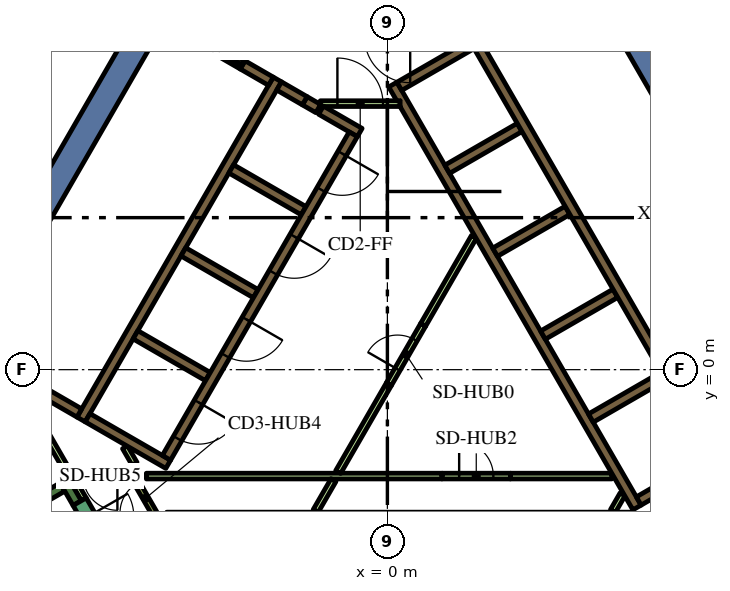
"""IFC4 building model, lengths in metres.
Left out: names, types, materials, properties, quantities, classifications, styles, units other than length and angle.
Written with IfcOpenShell. Run it as: python <this file> out.ifc"""

import sys

from ifc_helpers import new_model, si_unit, direction, frame, frame_2d, origin, place, context, subcontext, project, spatial, polyline, rectangle, outline, extrude, element, fill, save


model = new_model("IFC4")
c1 = context("Model", 3, precision=1e-05, world=origin(), true_north=direction((0.0, 1.0)))
c2 = subcontext(c1, "Body", "Model", "MODEL_VIEW")
j1 = project(units=[si_unit("LENGTHUNIT", "METRE"), si_unit("PLANEANGLEUNIT", "RADIAN")], contexts=[c1])
p1 = place(None, origin())
s1 = spatial("IfcSite", under=j1, at=p1, CompositionType="ELEMENT")
p2 = place(p1, origin())
s2 = spatial("IfcBuilding", under=s1, at=p2, CompositionType="ELEMENT")
p3 = place(p2, frame((0.0, 0.0, 205.8)))
s3 = spatial("IfcBuildingStorey", under=s2, at=p3, CompositionType="ELEMENT", Elevation=205.8)
p4 = place(p3, frame((8.235, 5.736, 0.0), z_axis=(0.0, 0.0, 1.0), x_axis=(-0.499983401189, 0.8660349869, 0.0)))
e1 = element("IfcWall", 1, at=p4, inside=s3, PredefinedType="SOLIDWALL", context=c2, shape_type="SweptSolid", body=[
    extrude(rectangle(XDim=12.472, YDim=0.7, at=frame_2d((6.236, 0.0))), origin(), (0.0, 0.0, 1.0), 4.2),
])
p5 = place(p3, frame((-4.696, 11.867, 0.0), z_axis=(0.0, 0.0, 1.0), x_axis=(-0.500003726532, -0.866023252259, 0.0)))
e2 = element("IfcWall", 2, at=p5, inside=s3, PredefinedType="SOLIDWALL", context=c2, shape_type="SweptSolid", body=[
    extrude(rectangle(XDim=12.848, YDim=0.7, at=frame_2d((6.424, 0.0))), origin(), (0.0, 0.0, 1.0), 4.2),
])
p6 = place(p3, frame((-14.44, -6.49, 0.0), z_axis=(0.0, 0.0, 1.0), x_axis=(0.866022966069, 0.500004222222, 0.0)))
e3 = element("IfcWall", 3, at=p6, inside=s3, PredefinedType="SOLIDWALL", context=c2, shape_type="SweptSolid", body=[
    extrude(rectangle(XDim=6.8, YDim=0.25, at=frame_2d((3.4, 0.0))), origin(), (0.0, 0.0, 1.0), 4.2),
])
p7 = place(p3, frame((-8.163, -3.511, 0.0), z_axis=(0.0, 0.0, 1.0), x_axis=(-0.499994068514, 0.866028828302, 0.0)))
e4 = element("IfcWall", 4, at=p7, inside=s3, PredefinedType="SOLIDWALL", context=c2, shape_type="SweptSolid", body=[
    extrude(rectangle(XDim=0.674, YDim=0.25, at=frame_2d((0.337, 0.0))), origin(), (0.0, 0.0, 1.0), 4.2),
])
p8 = place(p3, origin())
e5 = element("IfcWall", 5, at=p8, inside=s3, PredefinedType="SOLIDWALL", context=c2, shape_type="SweptSolid", body=[
    extrude(outline(polyline([(0.332, 6.925), (0.335, 6.925), (0.335, 6.925), (0.335, 6.925), (0.335, 7.075), (0.335, 7.075), (0.335, 7.075), (0.245, 7.075), (0.035, 7.439), (0.252, 7.564), (0.377, 7.348), (1.512, 5.382), (1.637, 5.165), (2.221, 4.153), (2.771, 3.199), (2.896, 2.983), (3.138, 2.564), (4.031, 1.017), (4.156, 0.801), (5.292, -1.165), (5.417, -1.382), (6.073, -2.519), (6.552, -3.348), (6.677, -3.564), (6.46, -3.689), (0.332, 6.925)])), origin(), (0.0, 0.0, 1.0), 4.2),
])
p9 = place(p3, frame((3.1, 9.064, 0.0), z_axis=(0.0, 0.0, 1.0), x_axis=(-0.866030133475, -0.499991807846, 0.0)))
e6 = element("IfcWall", 6, at=p9, inside=s3, PredefinedType="SOLIDWALL", context=c2, shape_type="SweptSolid", body=[
    extrude(rectangle(XDim=3.217, YDim=0.25, at=frame_2d((1.608, 0.0))), origin(), (0.0, 0.0, 1.0), 4.2),
])
p10 = place(p3, frame((1.574, 5.274, 0.0), z_axis=(0.0, 0.0, 1.0), x_axis=(0.866028486751, 0.499994660107, 0.0)))
e7 = element("IfcWall", 7, at=p10, inside=s3, PredefinedType="SOLIDWALL", context=c2, shape_type="SweptSolid", body=[
    extrude(rectangle(XDim=2.2, YDim=0.25, at=frame_2d((1.1, 0.0))), origin(), (0.0, 0.0, 1.0), 4.2),
])
for number, where, z_axis, x_axis in (
    (8, (2.834, 3.091, 0.0), (0.0, 0.0, 1.0), (0.866, 0.5, 0.0)),
    (9, (4.094, 0.909, 0.0), (0.0, 0.0, 1.0), (0.866, 0.5, 0.0)),
    (10, (5.354, -1.274, 0.0), (0.0, 0.0, 1.0), (0.866, 0.5, 0.0)),
):
    element("IfcWall", number, at=place(p3, frame(where, z_axis=z_axis, x_axis=x_axis)), inside=s3, PredefinedType="SOLIDWALL", context=c2, shape_type="SweptSolid", body=[
        extrude(rectangle(XDim=2.2, YDim=0.25, at=frame_2d((1.1, 0.0))), origin(), (0.0, 0.0, 1.0), 4.2),
    ])
p11 = place(p3, frame((11.507, -0.631, 0.0), z_axis=(0.0, 0.0, 1.0), x_axis=(-0.866011447264, -0.500024172624, 0.0)))
e11 = element("IfcWall", 11, at=p11, inside=s3, PredefinedType="SOLIDWALL", context=c2, shape_type="SweptSolid", body=[
    extrude(rectangle(XDim=5.65, YDim=0.25, at=frame_2d((2.825, 0.0))), origin(), (0.0, 0.0, 1.0), 4.2),
])
p12 = place(p3, frame((-8.06, -1.311, 0.0), z_axis=(0.0, 0.0, 1.0), x_axis=(0.50000273126, 0.866023826885, 0.0)))
e12 = element("IfcWall", 12, at=p12, inside=s3, PredefinedType="SOLIDWALL", context=c2, shape_type="SweptSolid", body=[
    extrude(rectangle(XDim=10.33, YDim=0.25, at=frame_2d((5.165, 0.0))), origin(), (0.0, 0.0, 1.0), 4.2),
])
p13 = place(p3, frame((-1.819, 6.87, 0.0), z_axis=(0.0, 0.0, 1.0), x_axis=(-0.866294599386, 0.499533449405, 0.0)))
e13 = element("IfcWall", 13, at=p13, inside=s3, PredefinedType="SOLIDWALL", context=c2, shape_type="SweptSolid", body=[
    extrude(rectangle(XDim=0.41, YDim=0.25, at=frame_2d((0.205, 0.0))), origin(), (0.0, 0.0, 1.0), 4.2),
])
p14 = place(p3, frame((-2.849, 7.465, 0.0), z_axis=(0.0, 0.0, 1.0), x_axis=(0.865955664968, -0.500120771724, 0.0)))
e14 = element("IfcWall", 14, at=p14, inside=s3, PredefinedType="SOLIDWALL", context=c2, shape_type="SweptSolid", body=[
    extrude(rectangle(XDim=0.778, YDim=0.25, at=frame_2d((0.389, 0.0))), origin(), (0.0, 0.0, 1.0), 4.2),
])
p15 = place(p3, frame((-0.728, 6.24, 0.0), z_axis=(0.0, 0.0, 1.0), x_axis=(-0.866002680491, 0.500039355833, 0.0)))
e15 = element("IfcWall", 15, at=p15, inside=s3, PredefinedType="SOLIDWALL", context=c2, shape_type="SweptSolid", body=[
    extrude(rectangle(XDim=1.178, YDim=0.25, at=frame_2d((0.589, 0.0))), origin(), (0.0, 0.0, 1.0), 4.2),
])
for number, where, z_axis, x_axis in (
    (16, (-2.204, 4.182, 0.0), (0.0, 0.0, 1.0), (-0.866, 0.5, 0.0)),
    (17, (-5.369, 3.1, 0.0), (0.0, 0.0, 1.0), (0.866, -0.5, 0.0)),
    (18, (-4.724, -0.182, 0.0), (0.0, 0.0, 1.0), (-0.866, 0.5, 0.0)),
):
    element("IfcWall", number, at=place(p3, frame(where, z_axis=z_axis, x_axis=x_axis)), inside=s3, PredefinedType="SOLIDWALL", context=c2, shape_type="SweptSolid", body=[
        extrude(rectangle(XDim=2.2, YDim=0.25, at=frame_2d((1.1, 0.0))), origin(), (0.0, 0.0, 1.0), 4.2),
    ])
p16 = place(p3, frame((-7.889, -1.265, 0.0), z_axis=(0.0, 0.0, 1.0), x_axis=(0.866057815567, -0.499943856944, 0.0)))
e19 = element("IfcWall", 19, at=p16, inside=s3, PredefinedType="SOLIDWALL", context=c2, shape_type="SweptSolid", body=[
    extrude(rectangle(XDim=2.45, YDim=0.25, at=frame_2d((1.225, 0.0))), origin(), (0.0, 0.0, 1.0), 4.2),
])
p17 = place(p3, frame((-9.95, -0.075, 0.0), z_axis=(0.0, 0.0, 1.0), x_axis=(0.865962177421, -0.500109495288, 0.0)))
e20 = element("IfcWall", 20, at=p17, inside=s3, PredefinedType="SOLIDWALL", context=c2, shape_type="SweptSolid", body=[
    extrude(rectangle(XDim=2.129, YDim=0.25, at=frame_2d((1.065, 0.0))), origin(), (0.0, 0.0, 1.0), 4.2),
])
p18 = place(p3, frame((-3.809, 8.019, 0.0), z_axis=(0.0, 0.0, 1.0), x_axis=(0.866010229787, -0.500026281214, 0.0)))
e21 = element("IfcWall", 21, at=p18, inside=s3, PredefinedType="SOLIDWALL", context=c2, shape_type="SweptSolid", body=[
    extrude(rectangle(XDim=0.858, YDim=0.25, at=frame_2d((0.429, 0.0))), origin(), (0.0, 0.0, 1.0), 4.2),
])
e22 = element("IfcWall", 22, at=p8, inside=s3, PredefinedType="SOLIDWALL", context=c2, shape_type="SweptSolid", body=[
    extrude(outline(polyline([(-3.748, 8.128), (-3.813, 8.015), (-4.027, 8.139), (-4.017, 8.156), (-4.008, 8.173), (-4.0, 8.192), (-3.995, 8.21), (-3.991, 8.23), (-3.99, 8.25), (-3.99, 8.268), (-3.748, 8.128)])), origin(), (0.0, 0.0, 1.0), 4.2),
])
p19 = place(p3, frame((-9.718, -0.417, 0.0), z_axis=(0.0, 0.0, 1.0), x_axis=(0.499966538646, -0.866044721844, 0.0)))
e23 = element("IfcWall", 23, at=p19, inside=s3, PredefinedType="PARTITIONING", context=c2, shape_type="SweptSolid", body=[
    extrude(rectangle(XDim=2.511, YDim=0.15, at=frame_2d((1.255, 0.0))), origin(), (0.0, 0.0, 1.0), 3.45),
])
p20 = place(p3, frame((0.941, 1.179, 0.0), z_axis=(0.0, 0.0, 1.0), x_axis=(0.499962406319, 0.866047107418, 0.0)))
e24 = element("IfcWall", 24, at=p20, inside=s3, PredefinedType="PARTITIONING", context=c2, shape_type="SweptSolid", body=[
    extrude(rectangle(XDim=2.672, YDim=0.15, at=frame_2d((1.336, 0.0))), origin(), (0.0, 0.0, 1.0), 3.45),
])
p21 = place(p3, frame((1.438, -2.8, 0.0), z_axis=(0.0, 0.0, 1.0), x_axis=(-1.0, 0.0, 0.0)))
e25 = element("IfcWall", 25, at=p21, inside=s3, PredefinedType="PARTITIONING", context=c2, shape_type="SweptSolid", body=[
    extrude(rectangle(XDim=7.781, YDim=0.15, at=frame_2d((3.891, 0.0))), origin(), (0.0, 0.0, 1.0), 3.45),
])
p22 = place(p3, frame((-1.418, -2.907, 0.0), z_axis=(0.0, 0.0, 1.0), x_axis=(-0.499978056798, -0.866038072327, 0.0)))
e26 = element("IfcWall", 26, at=p22, inside=s3, PredefinedType="PARTITIONING", context=c2, shape_type="SweptSolid", body=[
    extrude(rectangle(XDim=0.937, YDim=0.15, at=frame_2d((0.469, 0.0))), origin(), (0.0, 0.0, 1.0), 3.45),
])
for number, where, z_axis, x_axis in (
    (27, (-1.295, -2.693, 0.0), (0.0, 0.0, 1.0), (0.5, 0.866, 0.0)),
    (28, (3.238, -2.8, 0.0), (0.0, 0.0, 1.0), (1.0, 0.0, 0.0)),
):
    element("IfcWall", number, at=place(p3, frame(where, z_axis=z_axis, x_axis=x_axis)), inside=s3, PredefinedType="PARTITIONING", context=c2, shape_type="SweptSolid", body=[
        extrude(rectangle(XDim=2.672, YDim=0.15, at=frame_2d((1.336, 0.0))), origin(), (0.0, 0.0, 1.0), 3.45),
    ])
p23 = place(p3, frame((-6.653, -2.477, 0.0), z_axis=(0.0, 0.0, 1.0), x_axis=(-0.500002592159, 0.866023907196, 0.0)))
e29 = element("IfcWall", 29, at=p23, inside=s3, PredefinedType="PARTITIONING", context=c2, shape_type="SweptSolid", body=[
    extrude(rectangle(XDim=0.503, YDim=0.15, at=frame_2d((0.251, 0.0))), origin(), (0.0, 0.0, 1.0), 3.45),
])
p24 = place(p3, frame((-7.99, -3.412, 0.0), z_axis=(0.0, 0.0, 1.0), x_axis=(-0.499858525911, 0.866107068482, 0.0)))
e30 = element("IfcWall", 30, at=p24, inside=s3, PredefinedType="PARTITIONING", context=c2, shape_type="SweptSolid", body=[
    extrude(rectangle(XDim=0.466, YDim=0.15, at=frame_2d((0.233, 0.0))), origin(), (0.0, 0.0, 1.0), 3.45),
])
p25 = place(p3, frame((5.936, -3.718, 0.0), z_axis=(0.0, 0.0, 1.0), x_axis=(0.499890179513, 0.866088799389, 0.0)))
e31 = element("IfcWall", 31, at=p25, inside=s3, PredefinedType="PARTITIONING", context=c2, shape_type="SweptSolid", body=[
    extrude(rectangle(XDim=0.504, YDim=0.15, at=frame_2d((0.252, 0.0))), origin(), (0.0, 0.0, 1.0), 3.45),
])
p26 = place(p3, frame((8.565, -2.185, 0.0), z_axis=(0.0, 0.0, 1.0), x_axis=(-0.499997954832, 0.866026584559, 0.0)))
e32 = element("IfcWall", 32, at=p26, inside=s3, PredefinedType="SOLIDWALL", context=c2, shape_type="SweptSolid", body=[
    extrude(rectangle(XDim=12.35, YDim=0.25, at=frame_2d((6.175, 0.0))), origin(), (0.0, 0.0, 1.0), 4.2),
])
p27 = place(p26, frame((0.585, 0.0, 0.0)))
e33 = element("IfcOpeningElement", 33, at=p27, cuts=e32, PredefinedType="OPENING", context=c2, shape_type="SweptSolid", body=[
    extrude(rectangle(XDim=1.1, YDim=2.1, at=frame_2d((0.55, 1.05))), frame((0.0, 0.135, 0.0), z_axis=(0.0, -1.0, 0.0), x_axis=(1.0, 0.0, 0.0)), (0.0, 0.0, 1.0), 0.27),
])
p28 = place(p3, frame((-0.898, 6.194, 0.0), z_axis=(0.0, 0.0, 1.0), x_axis=(-0.499996202215, -0.866027596426, 0.0)))
e34 = element("IfcWall", 34, at=p28, inside=s3, PredefinedType="SOLIDWALL", context=c2, shape_type="SweptSolid", body=[
    extrude(rectangle(XDim=9.83, YDim=0.25, at=frame_2d((4.915, 0.0))), origin(), (0.0, 0.0, 1.0), 4.2),
])
p29 = place(p28, frame((0.585, 0.0, 0.0)))
e35 = element("IfcOpeningElement", 35, at=p29, cuts=e34, PredefinedType="OPENING", context=c2, shape_type="SweptSolid", body=[
    extrude(rectangle(XDim=1.1, YDim=2.1, at=frame_2d((0.55, 1.05))), frame((0.0, 0.135, 0.0), z_axis=(0.0, -1.0, 0.0), x_axis=(1.0, 0.0, 0.0)), (0.0, 0.0, 1.0), 0.27),
])
p30 = place(p28, frame((3.105, 0.0, 0.0)))
e36 = element("IfcOpeningElement", 36, at=p30, cuts=e34, PredefinedType="OPENING", context=c2, shape_type="SweptSolid", body=[
    extrude(rectangle(XDim=1.1, YDim=2.1, at=frame_2d((0.55, 1.05))), frame((0.0, 0.135, 0.0), z_axis=(0.0, -1.0, 0.0), x_axis=(1.0, 0.0, 0.0)), (0.0, 0.0, 1.0), 0.27),
])
p31 = place(p28, frame((5.625, 0.0, 0.0)))
e37 = element("IfcOpeningElement", 37, at=p31, cuts=e34, PredefinedType="OPENING", context=c2, shape_type="SweptSolid", body=[
    extrude(rectangle(XDim=1.1, YDim=2.1, at=frame_2d((0.55, 1.05))), frame((0.0, 0.135, 0.0), z_axis=(0.0, -1.0, 0.0), x_axis=(1.0, 0.0, 0.0)), (0.0, 0.0, 1.0), 0.27),
])
p32 = place(p28, frame((8.145, 0.0, 0.0)))
e38 = element("IfcOpeningElement", 38, at=p32, cuts=e34, PredefinedType="OPENING", context=c2, shape_type="SweptSolid", body=[
    extrude(rectangle(XDim=1.1, YDim=2.1, at=frame_2d((0.55, 1.05))), frame((0.0, 0.135, 0.0), z_axis=(0.0, -1.0, 0.0), x_axis=(1.0, 0.0, 0.0)), (0.0, 0.0, 1.0), 0.27),
])
p33 = place(p3, frame((7.048, -5.292, 0.0), z_axis=(0.0, 0.0, 1.0), x_axis=(0.49994051562, 0.866059744384, 0.0)))
e39 = element("IfcWall", 39, at=p33, inside=s3, PredefinedType="SOLIDWALL", context=c2, shape_type="SweptSolid", body=[
    extrude(rectangle(XDim=2.1, YDim=0.4, at=frame_2d((1.05, 0.0))), origin(), (0.0, 0.0, 1.0), 4.2),
])
p34 = place(p33, frame((0.45, 0.0, 0.0)))
e40 = element("IfcOpeningElement", 40, at=p34, cuts=e39, PredefinedType="OPENING", context=c2, shape_type="SweptSolid", body=[
    extrude(rectangle(XDim=1.2, YDim=2.1, at=frame_2d((0.6, 1.05))), frame((0.0, 0.21, 0.0), z_axis=(0.0, -1.0, 0.0), x_axis=(1.0, 0.0, 0.0)), (0.0, 0.0, 1.0), 0.42),
])
p35 = place(p3, frame((-8.098, -3.474, 0.0), z_axis=(0.0, 0.0, 1.0), x_axis=(0.49994051562, -0.866059744384, 0.0)))
e41 = element("IfcWall", 41, at=p35, inside=s3, PredefinedType="SOLIDWALL", context=c2, shape_type="SweptSolid", body=[
    extrude(rectangle(XDim=2.1, YDim=0.4, at=frame_2d((1.05, 0.0))), origin(), (0.0, 0.0, 1.0), 4.2),
])
p36 = place(p35, frame((0.45, 0.0, 0.0)))
e42 = element("IfcOpeningElement", 42, at=p36, cuts=e41, PredefinedType="OPENING", context=c2, shape_type="SweptSolid", body=[
    extrude(rectangle(XDim=1.2, YDim=2.1, at=frame_2d((0.6, 1.05))), frame((0.0, 0.21, 0.0), z_axis=(0.0, -1.0, 0.0), x_axis=(1.0, 0.0, 0.0)), (0.0, 0.0, 1.0), 0.42),
])
p37 = place(p3, frame((-1.765, 7.0, 0.0), z_axis=(0.0, 0.0, 1.0), x_axis=(1.0, 0.0, 0.0)))
e43 = element("IfcWall", 43, at=p37, inside=s3, PredefinedType="PARTITIONING", context=c2, shape_type="SweptSolid", body=[
    extrude(rectangle(XDim=2.1, YDim=0.15, at=frame_2d((1.05, 0.0))), origin(), (0.0, 0.0, 1.0), 3.45),
])
p38 = place(p37, frame((0.45, 0.0, 0.0)))
e44 = element("IfcOpeningElement", 44, at=p38, cuts=e43, PredefinedType="OPENING", context=c2, shape_type="SweptSolid", body=[
    extrude(rectangle(XDim=1.2, YDim=2.1, at=frame_2d((0.6, 1.05))), frame((0.0, 0.085, 0.0), z_axis=(0.0, -1.0, 0.0), x_axis=(1.0, 0.0, 0.0)), (0.0, 0.0, 1.0), 0.17),
])
p39 = place(p3, frame((-5.861, -4.248, 0.0), z_axis=(0.0, 0.0, 1.0), x_axis=(-0.500043646338, 0.866000203093, 0.0)))
e45 = element("IfcWall", 45, at=p39, inside=s3, PredefinedType="PARTITIONING", context=c2, shape_type="SweptSolid", body=[
    extrude(rectangle(XDim=1.93, YDim=0.15, at=frame_2d((0.965, 0.0))), origin(), (0.0, 0.0, 1.0), 4.2),
])
p40 = place(p39, frame((0.55, 0.0, 0.0)))
e46 = element("IfcOpeningElement", 46, at=p40, cuts=e45, PredefinedType="OPENING", context=c2, shape_type="SweptSolid", body=[
    extrude(rectangle(XDim=0.9, YDim=2.1, at=frame_2d((0.45, 1.05))), frame((0.0, 0.085, 0.0), z_axis=(0.0, -1.0, 0.0), x_axis=(1.0, 0.0, 0.0)), (0.0, 0.0, 1.0), 0.17),
])
p41 = place(p3, frame((-5.659, 9.012, 0.0), z_axis=(0.0, 0.0, 1.0), x_axis=(0.866009402589, -0.500027713859, 0.0)))
e47 = element("IfcWall", 47, at=p41, inside=s3, PredefinedType="PARTITIONING", context=c2, shape_type="SweptSolid", body=[
    extrude(rectangle(XDim=2.1, YDim=0.12, at=frame_2d((1.05, 0.0))), origin(), (0.0, 0.0, 1.0), 3.45),
])
p42 = place(p41, frame((0.45, 0.0, 0.0)))
e48 = element("IfcOpeningElement", 48, at=p42, cuts=e47, PredefinedType="OPENING", context=c2, shape_type="SweptSolid", body=[
    extrude(rectangle(XDim=1.2, YDim=2.1, at=frame_2d((0.6, 1.05))), frame((0.0, 0.07, 0.0), z_axis=(0.0, -1.0, 0.0), x_axis=(1.0, 0.0, 0.0)), (0.0, 0.0, 1.0), 0.14),
])
p43 = place(p3, frame((0.041, -0.379, 0.0), z_axis=(0.0, 0.0, 1.0), x_axis=(0.499961193289, 0.866047807691, 0.0)))
e49 = element("IfcWall", 49, at=p43, inside=s3, PredefinedType="PARTITIONING", context=c2, shape_type="SweptSolid", body=[
    extrude(rectangle(XDim=1.8, YDim=0.15, at=frame_2d((0.9, 0.0))), origin(), (0.0, 0.0, 1.0), 3.45),
])
p44 = place(p43, frame((0.45, 0.0, 0.0)))
e50 = element("IfcOpeningElement", 50, at=p44, cuts=e49, PredefinedType="OPENING", context=c2, shape_type="SweptSolid", body=[
    extrude(rectangle(XDim=0.9, YDim=2.1, at=frame_2d((0.45, 1.05))), frame((0.0, 0.085, 0.0), z_axis=(0.0, -1.0, 0.0), x_axis=(1.0, 0.0, 0.0)), (0.0, 0.0, 1.0), 0.17),
])
p45 = place(p3, frame((1.438, -2.8, 0.0), z_axis=(0.0, 0.0, 1.0), x_axis=(1.0, 0.0, 0.0)))
e51 = element("IfcWall", 51, at=p45, inside=s3, PredefinedType="PARTITIONING", context=c2, shape_type="SweptSolid", body=[
    extrude(rectangle(XDim=1.8, YDim=0.15, at=frame_2d((0.9, 0.0))), origin(), (0.0, 0.0, 1.0), 3.45),
])
p46 = place(p45, frame((0.45, 0.0, 0.0)))
e52 = element("IfcOpeningElement", 52, at=p46, cuts=e51, PredefinedType="OPENING", context=c2, shape_type="SweptSolid", body=[
    extrude(rectangle(XDim=0.9, YDim=2.1, at=frame_2d((0.45, 1.05))), frame((0.0, 0.085, 0.0), z_axis=(0.0, -1.0, 0.0), x_axis=(1.0, 0.0, 0.0)), (0.0, 0.0, 1.0), 0.17),
])
p47 = place(p3, frame((-6.655, -2.8, 0.0), z_axis=(0.0, 0.0, 1.0), x_axis=(-1.0, 0.0, 0.0)))
e53 = element("IfcWall", 53, at=p47, inside=s3, PredefinedType="PARTITIONING", context=c2, shape_type="SweptSolid", body=[
    extrude(rectangle(XDim=1.8, YDim=0.15, at=frame_2d((0.9, 0.0))), origin(), (0.0, 0.0, 1.0), 3.45),
])
p48 = place(p47, frame((0.45, 0.0, 0.0)))
e54 = element("IfcOpeningElement", 54, at=p48, cuts=e53, PredefinedType="OPENING", context=c2, shape_type="SweptSolid", body=[
    extrude(rectangle(XDim=0.9, YDim=2.1, at=frame_2d((0.45, 1.05))), frame((0.0, 0.085, 0.0), z_axis=(0.0, -1.0, 0.0), x_axis=(1.0, 0.0, 0.0)), (0.0, 0.0, 1.0), 0.17),
])
p49 = place(p3, frame((-8.272, 9.972, 0.0), z_axis=(0.0, 0.0, 1.0), x_axis=(-0.5000018851, -0.866024315419, 0.0)))
e55 = element("IfcWall", 55, at=p49, inside=s3, PredefinedType="PARTITIONING", context=c2, shape_type="SweptSolid", body=[
    extrude(rectangle(XDim=9.0, YDim=0.2, at=frame_2d((4.5, 0.0))), origin(), (0.0, 0.0, 1.0), 3.45),
])
p50 = place(p29, origin())
e56 = element("IfcDoor", 56, at=p50, inside=s3, OperationType="DOUBLE_DOOR_SLIDING", PredefinedType="DOOR", context=c2, shape_type="SweptSolid", body=[
    extrude(rectangle(XDim=1.1, YDim=2.1, at=frame_2d((0.55, 1.05))), frame((0.0, 0.025, 0.0), z_axis=(0.0, -1.0, 0.0), x_axis=(1.0, 0.0, 0.0)), (0.0, 0.0, 1.0), 0.05),
])
fill(e35, e56)
p51 = place(p30, origin())
e57 = element("IfcDoor", 57, at=p51, inside=s3, OperationType="DOUBLE_DOOR_SLIDING", PredefinedType="DOOR", context=c2, shape_type="SweptSolid", body=[
    extrude(rectangle(XDim=1.1, YDim=2.1, at=frame_2d((0.55, 1.05))), frame((0.0, 0.025, 0.0), z_axis=(0.0, -1.0, 0.0), x_axis=(1.0, 0.0, 0.0)), (0.0, 0.0, 1.0), 0.05),
])
fill(e36, e57)
p52 = place(p31, origin())
e58 = element("IfcDoor", 58, at=p52, inside=s3, OperationType="DOUBLE_DOOR_SLIDING", PredefinedType="DOOR", context=c2, shape_type="SweptSolid", body=[
    extrude(rectangle(XDim=1.1, YDim=2.1, at=frame_2d((0.55, 1.05))), frame((0.0, 0.025, 0.0), z_axis=(0.0, -1.0, 0.0), x_axis=(1.0, 0.0, 0.0)), (0.0, 0.0, 1.0), 0.05),
])
fill(e37, e58)
p53 = place(p32, origin())
e59 = element("IfcDoor", 59, at=p53, inside=s3, OperationType="DOUBLE_DOOR_SLIDING", PredefinedType="DOOR", context=c2, shape_type="SweptSolid", body=[
    extrude(rectangle(XDim=1.1, YDim=2.1, at=frame_2d((0.55, 1.05))), frame((0.0, 0.025, 0.0), z_axis=(0.0, -1.0, 0.0), x_axis=(1.0, 0.0, 0.0)), (0.0, 0.0, 1.0), 0.05),
])
fill(e38, e59)
p54 = place(p38, origin())
e60 = element("IfcDoor", 60, at=p54, inside=s3, OperationType="SINGLE_SWING_LEFT", PredefinedType="DOOR", context=c2, shape_type="SweptSolid", body=[
    extrude(rectangle(XDim=1.2, YDim=2.1, at=frame_2d((0.6, 1.05))), frame((0.0, 0.025, 0.0), z_axis=(0.0, -1.0, 0.0), x_axis=(1.0, 0.0, 0.0)), (0.0, 0.0, 1.0), 0.05),
])
fill(e44, e60)
p55 = place(p40, origin())
e61 = element("IfcDoor", 61, at=p55, inside=s3, OperationType="SINGLE_SWING_LEFT", PredefinedType="DOOR", context=c2, shape_type="SweptSolid", body=[
    extrude(rectangle(XDim=0.9, YDim=2.1, at=frame_2d((0.45, 1.05))), frame((0.0, 0.025, 0.0), z_axis=(0.0, -1.0, 0.0), x_axis=(1.0, 0.0, 0.0)), (0.0, 0.0, 1.0), 0.05),
])
fill(e46, e61)
p56 = place(p42, origin())
e62 = element("IfcDoor", 62, at=p56, inside=s3, OperationType="SINGLE_SWING_LEFT", PredefinedType="DOOR", context=c2, shape_type="SweptSolid", body=[
    extrude(rectangle(XDim=1.2, YDim=2.1, at=frame_2d((0.6, 1.05))), frame((0.0, 0.025, 0.0), z_axis=(0.0, -1.0, 0.0), x_axis=(1.0, 0.0, 0.0)), (0.0, 0.0, 1.0), 0.05),
])
fill(e48, e62)
p57 = place(p44, origin())
e63 = element("IfcDoor", 63, at=p57, inside=s3, OperationType="SINGLE_SWING_LEFT", PredefinedType="DOOR", context=c2, shape_type="SweptSolid", body=[
    extrude(rectangle(XDim=0.9, YDim=2.1, at=frame_2d((0.45, 1.05))), frame((0.0, 0.025, 0.0), z_axis=(0.0, -1.0, 0.0), x_axis=(1.0, 0.0, 0.0)), (0.0, 0.0, 1.0), 0.05),
])
fill(e50, e63)
p58 = place(p46, origin())
e64 = element("IfcDoor", 64, at=p58, inside=s3, OperationType="SINGLE_SWING_LEFT", PredefinedType="DOOR", context=c2, shape_type="SweptSolid", body=[
    extrude(rectangle(XDim=0.9, YDim=2.1, at=frame_2d((0.45, 1.05))), frame((0.0, 0.025, 0.0), z_axis=(0.0, -1.0, 0.0), x_axis=(1.0, 0.0, 0.0)), (0.0, 0.0, 1.0), 0.05),
])
fill(e52, e64)
p59 = place(p48, origin())
e65 = element("IfcDoor", 65, at=p59, inside=s3, OperationType="SINGLE_SWING_LEFT", PredefinedType="DOOR", context=c2, shape_type="SweptSolid", body=[
    extrude(rectangle(XDim=0.9, YDim=2.1, at=frame_2d((0.45, 1.05))), frame((0.0, 0.025, 0.0), z_axis=(0.0, -1.0, 0.0), x_axis=(1.0, 0.0, 0.0)), (0.0, 0.0, 1.0), 0.05),
])
fill(e54, e65)
save(model, sys.argv[1])
